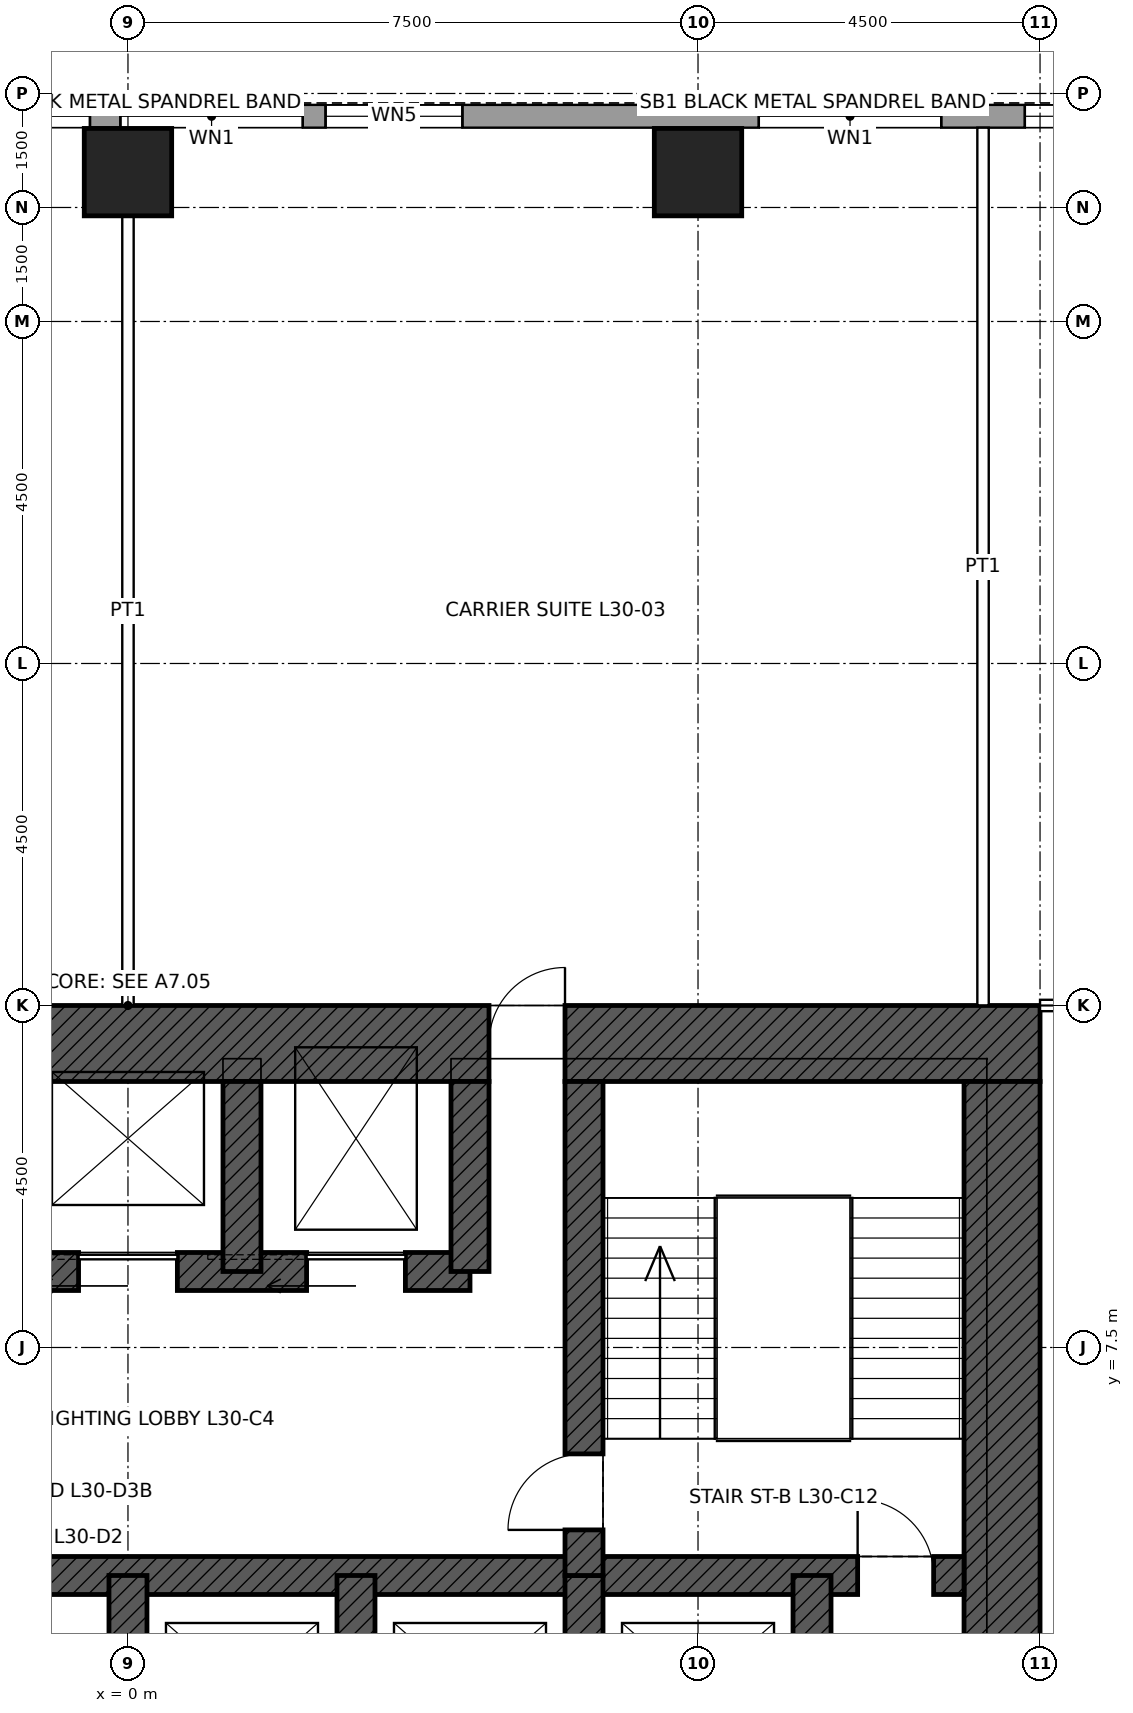
"""IFC4 building model, lengths in metres.
Left out: names, types, materials, properties, quantities, classifications, styles, units other than length and angle.
Written with IfcOpenShell. Run it as: python <this file> out.ifc"""

import sys

from ifc_helpers import new_model, si_unit, direction, frame, frame_2d, origin, origin_2d, place, context, subcontext, project, spatial, rectangle, hollow_rectangle, extrude, element, fill, save


model = new_model("IFC4")
c1 = context("Model", 3, precision=1e-05, world=origin(), true_north=direction((0.0, 1.0)))
c2 = subcontext(c1, "Body", "Model", "MODEL_VIEW")
j1 = project(units=[si_unit("LENGTHUNIT", "METRE"), si_unit("PLANEANGLEUNIT", "RADIAN")], contexts=[c1])
p1 = place(None, origin())
s1 = spatial("IfcSite", under=j1, at=p1, CompositionType="ELEMENT")
p2 = place(p1, origin())
s2 = spatial("IfcBuilding", under=s1, at=p2, CompositionType="ELEMENT")
p3 = place(p2, frame((0.0, 0.0, 149.4)))
s3 = spatial("IfcBuildingStorey", under=s2, at=p3, CompositionType="ELEMENT", Elevation=149.4)
for number, where, z_axis, x_axis in (
    (1, (0.0, 22.965, 0.0), (0.0, 0.0, 1.0), (1.0, 0.0, 0.0)),
    (2, (7.5, 22.965, 0.0), (0.0, 0.0, 1.0), (1.0, 0.0, 0.0)),
):
    element("IfcColumn", number, at=place(p3, frame(where, z_axis=z_axis, x_axis=x_axis)), inside=s3, PredefinedType="COLUMN", context=c2, shape_type="SweptSolid", body=[
        extrude(hollow_rectangle(XDim=1.15, YDim=1.15, WallThickness=0.075, at=origin_2d()), origin(), (0.0, 0.0, 1.0), 4.5),
    ])
p4 = place(p3, frame((-12.0, 11.5, 0.0), z_axis=(0.0, 0.0, 1.0), x_axis=(1.0, 0.0, 0.0)))
e3 = element("IfcWall", 3, at=p4, inside=s3, PredefinedType="SHEAR", context=c2, shape_type="SweptSolid", body=[
    extrude(rectangle(XDim=24.0, YDim=1.0, at=frame_2d((12.0, 0.0))), origin(), (0.0, 0.0, 1.0), 4.5),
])
p5 = place(p4, frame((6.25, 0.0, 0.0)))
e4 = element("IfcOpeningElement", 4, at=p5, cuts=e3, PredefinedType="OPENING", context=c2, shape_type="SweptSolid", body=[
    extrude(rectangle(XDim=1.0, YDim=2.4, at=frame_2d((0.5, 1.2))), frame((0.0, 0.51, 0.0), z_axis=(0.0, -1.0, 0.0), x_axis=(1.0, 0.0, 0.0)), (0.0, 0.0, 1.0), 1.02),
])
p6 = place(p4, frame((16.75, 0.0, 0.0)))
e5 = element("IfcOpeningElement", 5, at=p6, cuts=e3, PredefinedType="OPENING", context=c2, shape_type="SweptSolid", body=[
    extrude(rectangle(XDim=1.0, YDim=2.4, at=frame_2d((0.5, 1.2))), frame((0.0, 0.51, 0.0), z_axis=(0.0, -1.0, 0.0), x_axis=(1.0, 0.0, 0.0)), (0.0, 0.0, 1.0), 1.02),
])
p7 = place(p3, frame((11.5, 11.0, 0.0), z_axis=(0.0, 0.0, 1.0), x_axis=(0.0, -1.0, 0.0)))
e6 = element("IfcWall", 6, at=p7, inside=s3, PredefinedType="SHEAR", context=c2, shape_type="SweptSolid", body=[
    extrude(rectangle(XDim=22.0, YDim=1.0, at=frame_2d((11.0, 0.0))), origin(), (0.0, 0.0, 1.0), 4.5),
])
p8 = place(p7, frame((10.5, 0.0, 0.0)))
e7 = element("IfcOpeningElement", 7, at=p8, cuts=e6, PredefinedType="OPENING", context=c2, shape_type="SweptSolid", body=[
    extrude(rectangle(XDim=1.0, YDim=2.4, at=frame_2d((0.5, 1.2))), frame((0.0, 0.51, 0.0), z_axis=(0.0, -1.0, 0.0), x_axis=(1.0, 0.0, 0.0)), (0.0, 0.0, 1.0), 1.02),
])
p9 = place(p3, frame((-11.0, 4.5, 0.0), z_axis=(0.0, 0.0, 1.0), x_axis=(1.0, 0.0, 0.0)))
e8 = element("IfcWall", 8, at=p9, inside=s3, PredefinedType="SHEAR", context=c2, shape_type="SweptSolid", body=[
    extrude(rectangle(XDim=22.0, YDim=0.5, at=frame_2d((11.0, 0.0))), origin(), (0.0, 0.0, 1.0), 4.5),
])
p10 = place(p9, frame((0.4, 0.0, 0.0)))
e9 = element("IfcOpeningElement", 9, at=p10, cuts=e8, PredefinedType="OPENING", context=c2, shape_type="SweptSolid", body=[
    extrude(rectangle(XDim=1.0, YDim=2.1, at=frame_2d((0.5, 1.05))), frame((0.0, 0.26, 0.0), z_axis=(0.0, -1.0, 0.0), x_axis=(1.0, 0.0, 0.0)), (0.0, 0.0, 1.0), 0.52),
])
p11 = place(p9, frame((20.6, 0.0, 0.0)))
e10 = element("IfcOpeningElement", 10, at=p11, cuts=e8, PredefinedType="OPENING", context=c2, shape_type="SweptSolid", body=[
    extrude(rectangle(XDim=1.0, YDim=2.1, at=frame_2d((0.5, 1.05))), frame((0.0, 0.26, 0.0), z_axis=(0.0, -1.0, 0.0), x_axis=(1.0, 0.0, 0.0)), (0.0, 0.0, 1.0), 0.52),
])
p12 = place(p3, frame((-4.5, 8.5, 0.0), z_axis=(0.0, 0.0, 1.0), x_axis=(1.0, 0.0, 0.0)))
e11 = element("IfcWall", 11, at=p12, inside=s3, PredefinedType="SHEAR", context=c2, shape_type="SweptSolid", body=[
    extrude(rectangle(XDim=9.0, YDim=0.5, at=frame_2d((4.5, 0.0))), origin(), (0.0, 0.0, 1.0), 4.5),
])
p13 = place(p12, frame((0.85, 0.0, 0.0)))
e12 = element("IfcOpeningElement", 12, at=p13, cuts=e11, PredefinedType="OPENING", context=c2, shape_type="SweptSolid", body=[
    extrude(rectangle(XDim=1.3, YDim=2.4, at=frame_2d((0.65, 1.2))), frame((0.0, 0.26, 0.0), z_axis=(0.0, -1.0, 0.0), x_axis=(1.0, 0.0, 0.0)), (0.0, 0.0, 1.0), 0.52),
])
p14 = place(p12, frame((6.85, 0.0, 0.0)))
e13 = element("IfcOpeningElement", 13, at=p14, cuts=e11, PredefinedType="OPENING", context=c2, shape_type="SweptSolid", body=[
    extrude(rectangle(XDim=1.3, YDim=2.4, at=frame_2d((0.65, 1.2))), frame((0.0, 0.26, 0.0), z_axis=(0.0, -1.0, 0.0), x_axis=(1.0, 0.0, 0.0)), (0.0, 0.0, 1.0), 0.52),
])
p15 = place(p12, frame((3.85, 0.0, 0.0)))
e14 = element("IfcOpeningElement", 14, at=p15, cuts=e11, PredefinedType="OPENING", context=c2, shape_type="SweptSolid", body=[
    extrude(rectangle(XDim=1.3, YDim=2.4, at=frame_2d((0.65, 1.2))), frame((0.0, 0.26, 0.0), z_axis=(0.0, -1.0, 0.0), x_axis=(1.0, 0.0, 0.0)), (0.0, 0.0, 1.0), 0.52),
])
for number, where, z_axis, x_axis in (
    (15, (9.0, 1.5, 0.0), (0.0, 0.0, 1.0), (0.0, 1.0, 0.0)),
    (16, (0.0, 1.5, 0.0), (0.0, 0.0, 1.0), (0.0, 1.0, 0.0)),
    (17, (3.0, 1.5, 0.0), (0.0, 0.0, 1.0), (0.0, 1.0, 0.0)),
    (18, (6.0, 1.5, 0.0), (0.0, 0.0, 1.0), (0.0, 1.0, 0.0)),
):
    element("IfcWall", number, at=place(p3, frame(where, z_axis=z_axis, x_axis=x_axis)), inside=s3, PredefinedType="SHEAR", context=c2, shape_type="SweptSolid", body=[
        extrude(rectangle(XDim=3.0, YDim=0.5, at=frame_2d((1.5, 0.0))), origin(), (0.0, 0.0, 1.0), 4.5),
    ])
p16 = place(p3, frame((6.0, 4.5, 0.0), z_axis=(0.0, 0.0, 1.0), x_axis=(0.0, 1.0, 0.0)))
e19 = element("IfcWall", 19, at=p16, inside=s3, PredefinedType="SHEAR", context=c2, shape_type="SweptSolid", body=[
    extrude(rectangle(XDim=6.5, YDim=0.5, at=frame_2d((3.25, 0.0))), origin(), (0.0, 0.0, 1.0), 4.5),
])
p17 = place(p16, frame((0.6, 0.0, 0.0)))
e20 = element("IfcOpeningElement", 20, at=p17, cuts=e19, PredefinedType="OPENING", context=c2, shape_type="SweptSolid", body=[
    extrude(rectangle(XDim=1.0, YDim=2.1, at=frame_2d((0.5, 1.05))), frame((0.0, 0.26, 0.0), z_axis=(0.0, -1.0, 0.0), x_axis=(1.0, 0.0, 0.0)), (0.0, 0.0, 1.0), 0.52),
])
for number, where, z_axis, x_axis in (
    (21, (4.5, 8.5, 0.0), (0.0, 0.0, 1.0), (0.0, 1.0, 0.0)),
    (22, (1.5, 8.5, 0.0), (0.0, 0.0, 1.0), (0.0, 1.0, 0.0)),
):
    element("IfcWall", number, at=place(p3, frame(where, z_axis=z_axis, x_axis=x_axis)), inside=s3, PredefinedType="SHEAR", context=c2, shape_type="SweptSolid", body=[
        extrude(rectangle(XDim=2.5, YDim=0.5, at=frame_2d((1.25, 0.0))), origin(), (0.0, 0.0, 1.0), 4.5),
    ])
p18 = place(p3, frame((-16.2, 23.7, 0.0), z_axis=(0.0, 0.0, 1.0), x_axis=(1.0, 0.0, 0.0)))
e23 = element("IfcWall", 23, at=p18, inside=s3, PredefinedType="SOLIDWALL", context=c2, shape_type="SweptSolid", body=[
    extrude(rectangle(XDim=32.4, YDim=0.3, at=frame_2d((16.2, 0.0))), origin(), (0.0, 0.0, 1.0), 4.3),
])
p19 = place(p18, frame((2.0, 0.0, 1.0)))
e24 = element("IfcOpeningElement", 24, at=p19, cuts=e23, PredefinedType="OPENING", context=c2, shape_type="SweptSolid", body=[
    extrude(rectangle(XDim=2.4, YDim=1.2, at=frame_2d((1.2, 0.6))), frame((0.0, 0.16, 0.0), z_axis=(0.0, -1.0, 0.0), x_axis=(1.0, 0.0, 0.0)), (0.0, 0.0, 1.0), 0.32),
])
p20 = place(p18, frame((5.5, 0.0, 1.0)))
e25 = element("IfcOpeningElement", 25, at=p20, cuts=e23, PredefinedType="OPENING", context=c2, shape_type="SweptSolid", body=[
    extrude(rectangle(XDim=2.4, YDim=1.2, at=frame_2d((1.2, 0.6))), frame((0.0, 0.16, 0.0), z_axis=(0.0, -1.0, 0.0), x_axis=(1.0, 0.0, 0.0)), (0.0, 0.0, 1.0), 0.32),
])
p21 = place(p18, frame((11.8, 0.0, 1.0)))
e26 = element("IfcOpeningElement", 26, at=p21, cuts=e23, PredefinedType="OPENING", context=c2, shape_type="SweptSolid", body=[
    extrude(rectangle(XDim=1.8, YDim=1.2, at=frame_2d((0.9, 0.6))), frame((0.0, 0.16, 0.0), z_axis=(0.0, -1.0, 0.0), x_axis=(1.0, 0.0, 0.0)), (0.0, 0.0, 1.0), 0.32),
])
p22 = place(p18, frame((13.9, 0.0, 1.0)))
e27 = element("IfcOpeningElement", 27, at=p22, cuts=e23, PredefinedType="OPENING", context=c2, shape_type="SweptSolid", body=[
    extrude(rectangle(XDim=1.8, YDim=1.2, at=frame_2d((0.9, 0.6))), frame((0.0, 0.16, 0.0), z_axis=(0.0, -1.0, 0.0), x_axis=(1.0, 0.0, 0.0)), (0.0, 0.0, 1.0), 0.32),
])
p23 = place(p18, frame((16.1, 0.0, 1.0)))
e28 = element("IfcOpeningElement", 28, at=p23, cuts=e23, PredefinedType="OPENING", context=c2, shape_type="SweptSolid", body=[
    extrude(rectangle(XDim=2.4, YDim=1.2, at=frame_2d((1.2, 0.6))), frame((0.0, 0.16, 0.0), z_axis=(0.0, -1.0, 0.0), x_axis=(1.0, 0.0, 0.0)), (0.0, 0.0, 1.0), 0.32),
])
p24 = place(p18, frame((18.8, 0.0, 1.0)))
e29 = element("IfcOpeningElement", 29, at=p24, cuts=e23, PredefinedType="OPENING", context=c2, shape_type="SweptSolid", body=[
    extrude(rectangle(XDim=1.8, YDim=1.2, at=frame_2d((0.9, 0.6))), frame((0.0, 0.16, 0.0), z_axis=(0.0, -1.0, 0.0), x_axis=(1.0, 0.0, 0.0)), (0.0, 0.0, 1.0), 0.32),
])
p25 = place(p18, frame((24.5, 0.0, 1.0)))
e30 = element("IfcOpeningElement", 30, at=p25, cuts=e23, PredefinedType="OPENING", context=c2, shape_type="SweptSolid", body=[
    extrude(rectangle(XDim=2.4, YDim=1.2, at=frame_2d((1.2, 0.6))), frame((0.0, 0.16, 0.0), z_axis=(0.0, -1.0, 0.0), x_axis=(1.0, 0.0, 0.0)), (0.0, 0.0, 1.0), 0.32),
])
p26 = place(p18, frame((28.0, 0.0, 1.0)))
e31 = element("IfcOpeningElement", 31, at=p26, cuts=e23, PredefinedType="OPENING", context=c2, shape_type="SweptSolid", body=[
    extrude(rectangle(XDim=2.4, YDim=1.2, at=frame_2d((1.2, 0.6))), frame((0.0, 0.16, 0.0), z_axis=(0.0, -1.0, 0.0), x_axis=(1.0, 0.0, 0.0)), (0.0, 0.0, 1.0), 0.32),
])
p27 = place(p3, frame((12.0, 12.0, 0.0), z_axis=(0.0, 0.0, 1.0), x_axis=(1.0, 0.0, 0.0)))
e32 = element("IfcWall", 32, at=p27, inside=s3, PredefinedType="PARTITIONING", context=c2, shape_type="SweptSolid", body=[
    extrude(rectangle(XDim=2.075, YDim=0.15, at=frame_2d((1.038, 0.0))), origin(), (0.0, 0.0, 1.0), 3.284),
])
p28 = place(p27, frame((0.5, 0.0, 0.0)))
e33 = element("IfcOpeningElement", 33, at=p28, cuts=e32, PredefinedType="OPENING", context=c2, shape_type="SweptSolid", body=[
    extrude(rectangle(XDim=1.0, YDim=2.1, at=frame_2d((0.5, 1.05))), frame((0.0, 0.085, 0.0), z_axis=(0.0, -1.0, 0.0), x_axis=(1.0, 0.0, 0.0)), (0.0, 0.0, 1.0), 0.17),
])
p29 = place(p3, frame((0.0, 12.0, 0.0), z_axis=(0.0, 0.0, 1.0), x_axis=(0.0, 1.0, 0.0)))
e34 = element("IfcWall", 34, at=p29, inside=s3, PredefinedType="PARTITIONING", context=c2, shape_type="SweptSolid", body=[
    extrude(rectangle(XDim=10.39, YDim=0.15, at=frame_2d((5.195, 0.0))), origin(), (0.0, 0.0, 1.0), 3.431),
])
p30 = place(p3, frame((11.25, 12.0, 0.0), z_axis=(0.0, 0.0, 1.0), x_axis=(0.0, 1.0, 0.0)))
e35 = element("IfcWall", 35, at=p30, inside=s3, PredefinedType="PARTITIONING", context=c2, shape_type="SweptSolid", body=[
    extrude(rectangle(XDim=11.55, YDim=0.15, at=frame_2d((5.775, 0.0))), origin(), (0.0, 0.0, 1.0), 3.431),
])
p31 = place(p22, origin())
e36 = element("IfcWindow", 36, at=p31, inside=s3, PartitioningType="SINGLE_PANEL", PredefinedType="WINDOW", context=c2, shape_type="SweptSolid", body=[
    extrude(rectangle(XDim=1.8, YDim=1.2, at=frame_2d((0.9, 0.6))), frame((0.0, 0.03, 0.0), z_axis=(0.0, -1.0, 0.0), x_axis=(1.0, 0.0, 0.0)), (0.0, 0.0, 1.0), 0.06),
])
fill(e27, e36)
p32 = place(p23, origin())
e37 = element("IfcWindow", 37, at=p32, inside=s3, PartitioningType="SINGLE_PANEL", PredefinedType="WINDOW", context=c2, shape_type="SweptSolid", body=[
    extrude(rectangle(XDim=2.4, YDim=1.2, at=frame_2d((1.2, 0.6))), frame((0.0, 0.03, 0.0), z_axis=(0.0, -1.0, 0.0), x_axis=(1.0, 0.0, 0.0)), (0.0, 0.0, 1.0), 0.06),
])
fill(e28, e37)
p33 = place(p24, origin())
e38 = element("IfcWindow", 38, at=p33, inside=s3, PartitioningType="SINGLE_PANEL", PredefinedType="WINDOW", context=c2, shape_type="SweptSolid", body=[
    extrude(rectangle(XDim=1.8, YDim=1.2, at=frame_2d((0.9, 0.6))), frame((0.0, 0.03, 0.0), z_axis=(0.0, -1.0, 0.0), x_axis=(1.0, 0.0, 0.0)), (0.0, 0.0, 1.0), 0.06),
])
fill(e29, e38)
p34 = place(p25, origin())
e39 = element("IfcWindow", 39, at=p34, inside=s3, PartitioningType="SINGLE_PANEL", PredefinedType="WINDOW", context=c2, shape_type="SweptSolid", body=[
    extrude(rectangle(XDim=2.4, YDim=1.2, at=frame_2d((1.2, 0.6))), frame((0.0, 0.03, 0.0), z_axis=(0.0, -1.0, 0.0), x_axis=(1.0, 0.0, 0.0)), (0.0, 0.0, 1.0), 0.06),
])
fill(e30, e39)
p35 = place(p26, origin())
e40 = element("IfcWindow", 40, at=p35, inside=s3, PartitioningType="SINGLE_PANEL", PredefinedType="WINDOW", context=c2, shape_type="SweptSolid", body=[
    extrude(rectangle(XDim=2.4, YDim=1.2, at=frame_2d((1.2, 0.6))), frame((0.0, 0.03, 0.0), z_axis=(0.0, -1.0, 0.0), x_axis=(1.0, 0.0, 0.0)), (0.0, 0.0, 1.0), 0.06),
])
fill(e31, e40)
p36 = place(p11, origin())
e41 = element("IfcDoor", 41, at=p36, inside=s3, OperationType="SINGLE_SWING_LEFT", PredefinedType="DOOR", context=c2, shape_type="SweptSolid", body=[
    extrude(rectangle(XDim=1.0, YDim=2.1, at=frame_2d((0.5, 1.05))), frame((0.0, 0.025, 0.0), z_axis=(0.0, -1.0, 0.0), x_axis=(1.0, 0.0, 0.0)), (0.0, 0.0, 1.0), 0.05),
])
fill(e10, e41)
p37 = place(p17, origin())
e42 = element("IfcDoor", 42, at=p37, inside=s3, OperationType="SINGLE_SWING_LEFT", PredefinedType="DOOR", context=c2, shape_type="SweptSolid", body=[
    extrude(rectangle(XDim=1.0, YDim=2.1, at=frame_2d((0.5, 1.05))), frame((0.0, 0.025, 0.0), z_axis=(0.0, -1.0, 0.0), x_axis=(1.0, 0.0, 0.0)), (0.0, 0.0, 1.0), 0.05),
])
fill(e20, e42)
p38 = place(p6, origin())
e43 = element("IfcDoor", 43, at=p38, inside=s3, OperationType="SINGLE_SWING_RIGHT", PredefinedType="DOOR", context=c2, shape_type="SweptSolid", body=[
    extrude(rectangle(XDim=1.0, YDim=2.4, at=frame_2d((0.5, 1.2))), frame((0.0, 0.485, 0.0), z_axis=(0.0, -1.0, 0.0), x_axis=(1.0, 0.0, 0.0)), (0.0, 0.0, 1.0), 0.05),
])
fill(e5, e43)
p39 = place(p14, origin())
e44 = element("IfcDoor", 44, at=p39, inside=s3, OperationType="SLIDING_TO_LEFT", PredefinedType="DOOR", context=c2, shape_type="SweptSolid", body=[
    extrude(rectangle(XDim=1.3, YDim=2.4, at=frame_2d((0.65, 1.2))), frame((0.0, 0.025, 0.0), z_axis=(0.0, -1.0, 0.0), x_axis=(1.0, 0.0, 0.0)), (0.0, 0.0, 1.0), 0.05),
])
fill(e13, e44)
p40 = place(p15, origin())
e45 = element("IfcDoor", 45, at=p40, inside=s3, OperationType="SLIDING_TO_LEFT", PredefinedType="DOOR", context=c2, shape_type="SweptSolid", body=[
    extrude(rectangle(XDim=1.3, YDim=2.4, at=frame_2d((0.65, 1.2))), frame((0.0, 0.025, 0.0), z_axis=(0.0, -1.0, 0.0), x_axis=(1.0, 0.0, 0.0)), (0.0, 0.0, 1.0), 0.05),
])
fill(e14, e45)
save(model, sys.argv[1])
